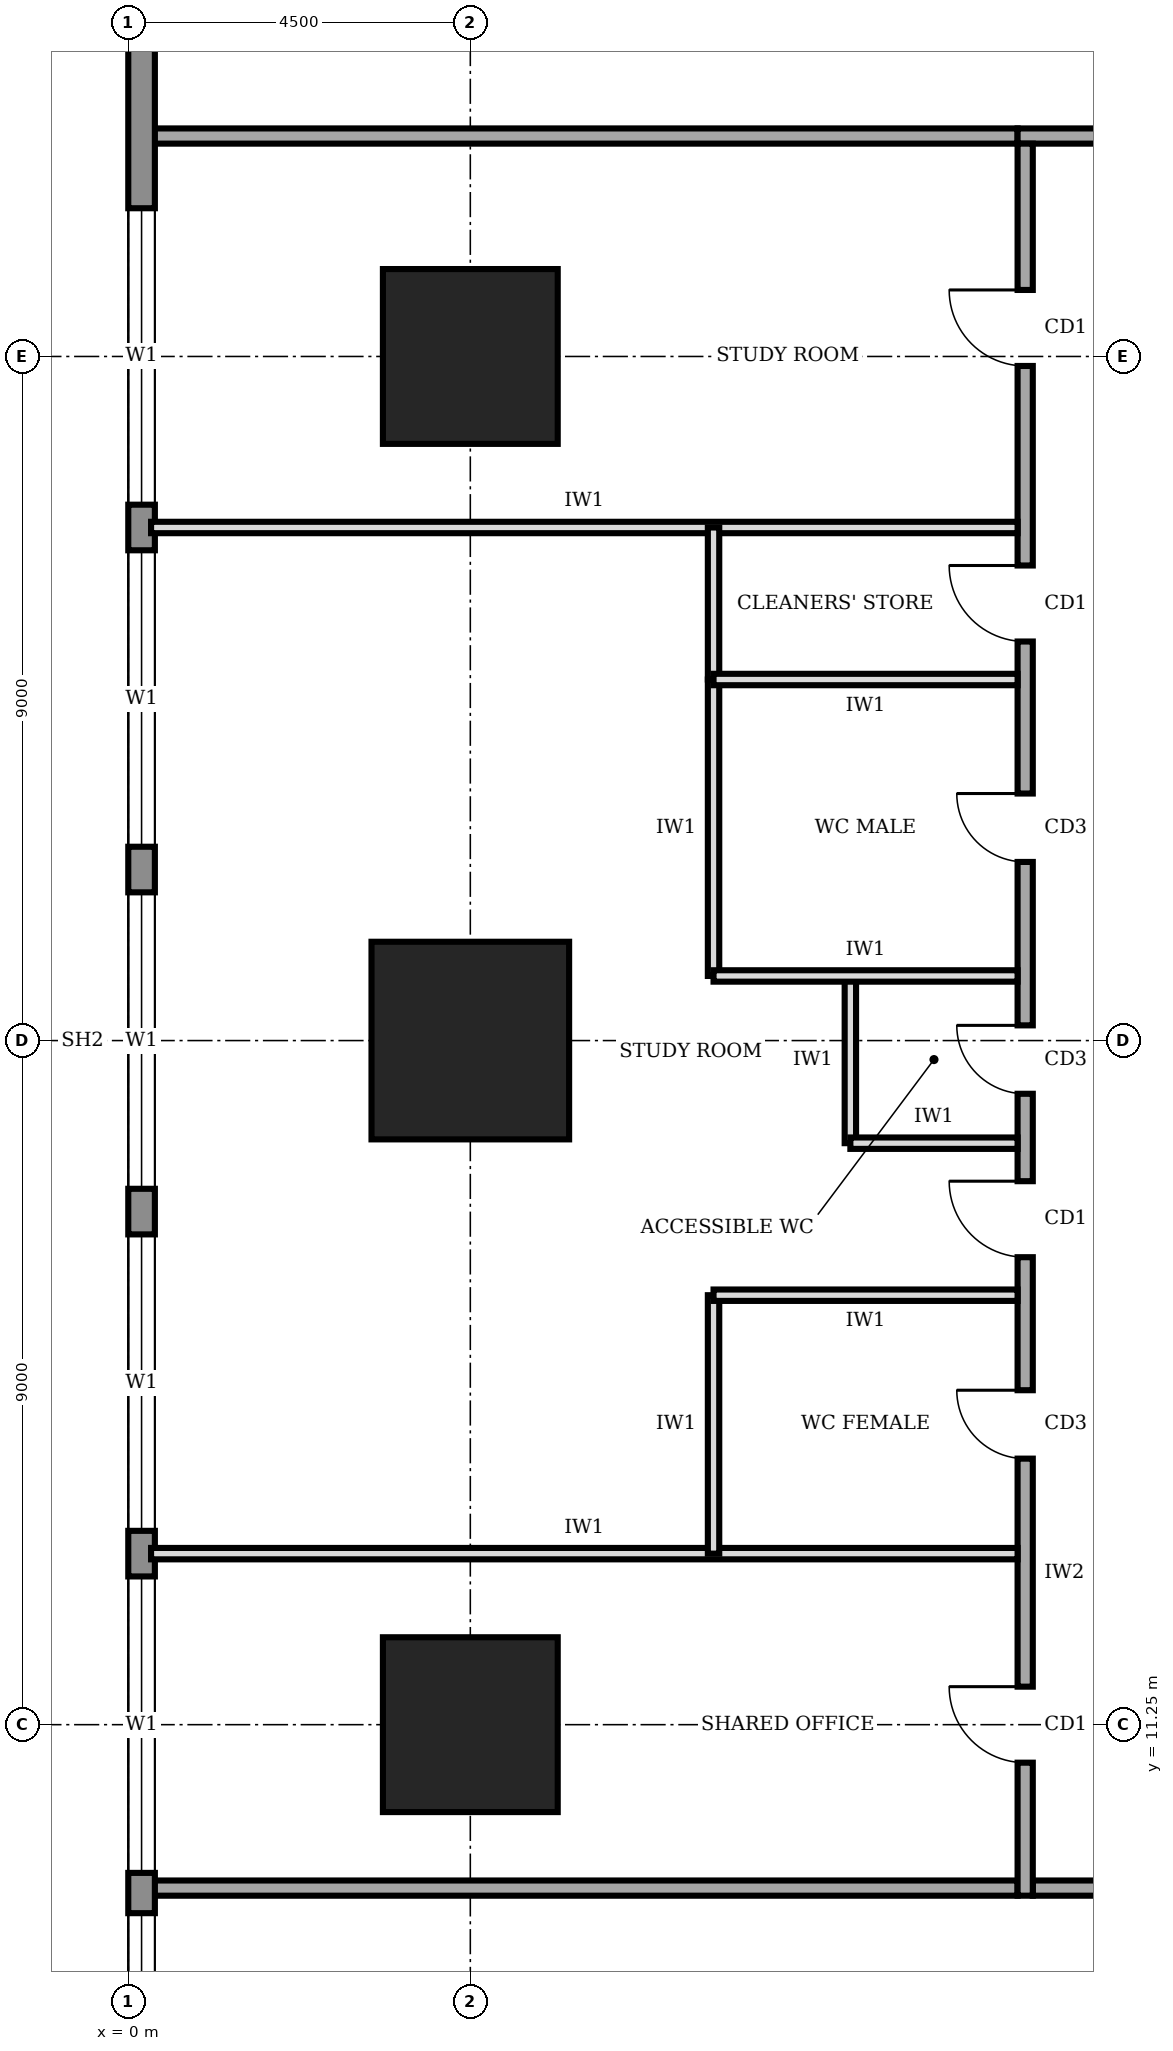
"""IFC4 building model, lengths in metres.
Left out: names, types, materials, properties, quantities, classifications, styles, units other than length and angle.
Written with IfcOpenShell. Run it as: python <this file> out.ifc"""

import sys

from ifc_helpers import new_model, si_unit, direction, frame, frame_2d, origin, origin_2d, place, context, subcontext, project, spatial, rectangle, extrude, element, fill, save


model = new_model("IFC4")
c1 = context("Model", 3, precision=1e-05, world=origin(), true_north=direction((0.0, 1.0)))
c2 = subcontext(c1, "Body", "Model", "MODEL_VIEW")
j1 = project(units=[si_unit("LENGTHUNIT", "METRE"), si_unit("PLANEANGLEUNIT", "RADIAN")], contexts=[c1])
p1 = place(None, origin())
s1 = spatial("IfcSite", under=j1, at=p1, CompositionType="ELEMENT")
p2 = place(p1, origin())
s2 = spatial("IfcBuilding", under=s1, at=p2, CompositionType="ELEMENT")
p3 = place(p2, frame((0.0, 0.0, 121.0)))
s3 = spatial("IfcBuildingStorey", under=s2, at=p3, CompositionType="ELEMENT", Elevation=121.0)
p4 = place(p3, frame((4.5, 11.25, 0.0), z_axis=(0.0, 0.0, 1.0), x_axis=(1.0, 0.0, 0.0)))
e1 = element("IfcColumn", 1, at=p4, inside=s3, PredefinedType="COLUMN", context=c2, shape_type="SweptSolid", body=[
    extrude(rectangle(XDim=2.3, YDim=2.3, at=origin_2d()), origin(), (0.0, 0.0, 1.0), 4.0),
])
p5 = place(p3, frame((4.5, 20.25, 0.0), z_axis=(0.0, 0.0, 1.0), x_axis=(1.0, 0.0, 0.0)))
e2 = element("IfcColumn", 2, at=p5, inside=s3, PredefinedType="COLUMN", context=c2, shape_type="SweptSolid", body=[
    extrude(rectangle(XDim=2.6, YDim=2.6, at=origin_2d()), origin(), (0.0, 0.0, 1.0), 4.0),
])
p6 = place(p3, frame((4.5, 29.25, 0.0), z_axis=(0.0, 0.0, 1.0), x_axis=(1.0, 0.0, 0.0)))
e3 = element("IfcColumn", 3, at=p6, inside=s3, PredefinedType="COLUMN", context=c2, shape_type="SweptSolid", body=[
    extrude(rectangle(XDim=2.3, YDim=2.3, at=origin_2d()), origin(), (0.0, 0.0, 1.0), 4.0),
])
p7 = place(p3, frame((0.175, 35.98, 0.0), z_axis=(0.0, 0.0, 1.0), x_axis=(0.0, -1.0, 0.0)))
e4 = element("IfcWall", 4, at=p7, inside=s3, PredefinedType="STANDARD", context=c2, shape_type="SweptSolid", body=[
    extrude(rectangle(XDim=31.46, YDim=0.35, at=frame_2d((15.73, 0.0))), origin(), (0.0, 0.0, 1.0), 3.75),
])
p8 = place(p7, frame((27.21, 0.0, 0.9)))
e5 = element("IfcOpeningElement", 5, at=p8, cuts=e4, PredefinedType="OPENING", context=c2, shape_type="SweptSolid", body=[
    extrude(rectangle(XDim=3.9, YDim=2.2, at=frame_2d((1.95, 1.1))), frame((0.0, 0.185, 0.0), z_axis=(0.0, -1.0, 0.0), x_axis=(1.0, 0.0, 0.0)), (0.0, 0.0, 1.0), 0.37),
])
p9 = place(p7, frame((22.78, 0.0, 0.9)))
e6 = element("IfcOpeningElement", 6, at=p9, cuts=e4, PredefinedType="OPENING", context=c2, shape_type="SweptSolid", body=[
    extrude(rectangle(XDim=3.9, YDim=2.2, at=frame_2d((1.95, 1.1))), frame((0.0, 0.185, 0.0), z_axis=(0.0, -1.0, 0.0), x_axis=(1.0, 0.0, 0.0)), (0.0, 0.0, 1.0), 0.37),
])
p10 = place(p7, frame((18.28, 0.0, 0.9)))
e7 = element("IfcOpeningElement", 7, at=p10, cuts=e4, PredefinedType="OPENING", context=c2, shape_type="SweptSolid", body=[
    extrude(rectangle(XDim=3.9, YDim=2.2, at=frame_2d((1.95, 1.1))), frame((0.0, 0.185, 0.0), z_axis=(0.0, -1.0, 0.0), x_axis=(1.0, 0.0, 0.0)), (0.0, 0.0, 1.0), 0.37),
])
p11 = place(p7, frame((13.78, 0.0, 0.9)))
e8 = element("IfcOpeningElement", 8, at=p11, cuts=e4, PredefinedType="OPENING", context=c2, shape_type="SweptSolid", body=[
    extrude(rectangle(XDim=3.9, YDim=2.2, at=frame_2d((1.95, 1.1))), frame((0.0, 0.185, 0.0), z_axis=(0.0, -1.0, 0.0), x_axis=(1.0, 0.0, 0.0)), (0.0, 0.0, 1.0), 0.37),
])
p12 = place(p7, frame((9.28, 0.0, 0.9)))
e9 = element("IfcOpeningElement", 9, at=p12, cuts=e4, PredefinedType="OPENING", context=c2, shape_type="SweptSolid", body=[
    extrude(rectangle(XDim=3.9, YDim=2.2, at=frame_2d((1.95, 1.1))), frame((0.0, 0.185, 0.0), z_axis=(0.0, -1.0, 0.0), x_axis=(1.0, 0.0, 0.0)), (0.0, 0.0, 1.0), 0.37),
])
p13 = place(p7, frame((4.78, 0.0, 0.9)))
e10 = element("IfcOpeningElement", 10, at=p13, cuts=e4, PredefinedType="OPENING", context=c2, shape_type="SweptSolid", body=[
    extrude(rectangle(XDim=3.9, YDim=2.2, at=frame_2d((1.95, 1.1))), frame((0.0, 0.185, 0.0), z_axis=(0.0, -1.0, 0.0), x_axis=(1.0, 0.0, 0.0)), (0.0, 0.0, 1.0), 0.37),
])
p14 = place(p3, frame((11.9, 9.1, 0.0), z_axis=(0.0, 0.0, 1.0), x_axis=(1.0, 0.0, 0.0)))
e11 = element("IfcWall", 11, at=p14, inside=s3, PredefinedType="SOLIDWALL", context=c2, shape_type="SweptSolid", body=[
    extrude(rectangle(XDim=17.65, YDim=0.2, at=frame_2d((8.825, 0.0))), origin(), (0.0, 0.0, 1.0), 3.75),
])
p15 = place(p14, frame((2.25, 0.0, 0.0)))
e12 = element("IfcOpeningElement", 12, at=p15, cuts=e11, PredefinedType="OPENING", context=c2, shape_type="SweptSolid", body=[
    extrude(rectangle(XDim=1.4, YDim=2.1, at=frame_2d((0.7, 1.05))), frame((0.0, 0.11, 0.0), z_axis=(0.0, -1.0, 0.0), x_axis=(1.0, 0.0, 0.0)), (0.0, 0.0, 1.0), 0.22),
])
p16 = place(p14, frame((10.1, 0.0, 0.0)))
e13 = element("IfcOpeningElement", 13, at=p16, cuts=e11, PredefinedType="OPENING", context=c2, shape_type="SweptSolid", body=[
    extrude(rectangle(XDim=1.0, YDim=2.1, at=frame_2d((0.5, 1.05))), frame((0.0, 0.11, 0.0), z_axis=(0.0, -1.0, 0.0), x_axis=(1.0, 0.0, 0.0)), (0.0, 0.0, 1.0), 0.22),
])
p17 = place(p14, frame((15.875, 0.0, 0.0)))
e14 = element("IfcOpeningElement", 14, at=p17, cuts=e11, PredefinedType="OPENING", context=c2, shape_type="SweptSolid", body=[
    extrude(rectangle(XDim=1.0, YDim=2.1, at=frame_2d((0.5, 1.05))), frame((0.0, 0.11, 0.0), z_axis=(0.0, -1.0, 0.0), x_axis=(1.0, 0.0, 0.0)), (0.0, 0.0, 1.0), 0.22),
])
p18 = place(p3, frame((29.35, 32.15, 0.0), z_axis=(0.0, 0.0, 1.0), x_axis=(-1.0, 0.0, 0.0)))
e15 = element("IfcWall", 15, at=p18, inside=s3, PredefinedType="SOLIDWALL", context=c2, shape_type="SweptSolid", body=[
    extrude(rectangle(XDim=17.65, YDim=0.2, at=frame_2d((8.825, 0.0))), origin(), (0.0, 0.0, 1.0), 3.75),
])
p19 = place(p18, frame((13.6, 0.0, 0.0)))
e16 = element("IfcOpeningElement", 16, at=p19, cuts=e15, PredefinedType="OPENING", context=c2, shape_type="SweptSolid", body=[
    extrude(rectangle(XDim=1.8, YDim=2.1, at=frame_2d((0.9, 1.05))), frame((0.0, 0.11, 0.0), z_axis=(0.0, -1.0, 0.0), x_axis=(1.0, 0.0, 0.0)), (0.0, 0.0, 1.0), 0.22),
])
p20 = place(p18, frame((6.35, 0.0, 0.0)))
e17 = element("IfcOpeningElement", 17, at=p20, cuts=e15, PredefinedType="OPENING", context=c2, shape_type="SweptSolid", body=[
    extrude(rectangle(XDim=1.0, YDim=2.1, at=frame_2d((0.5, 1.05))), frame((0.0, 0.11, 0.0), z_axis=(0.0, -1.0, 0.0), x_axis=(1.0, 0.0, 0.0)), (0.0, 0.0, 1.0), 0.22),
])
p21 = place(p18, frame((0.575, 0.0, 0.0)))
e18 = element("IfcOpeningElement", 18, at=p21, cuts=e15, PredefinedType="OPENING", context=c2, shape_type="SweptSolid", body=[
    extrude(rectangle(XDim=1.0, YDim=2.1, at=frame_2d((0.5, 1.05))), frame((0.0, 0.11, 0.0), z_axis=(0.0, -1.0, 0.0), x_axis=(1.0, 0.0, 0.0)), (0.0, 0.0, 1.0), 0.22),
])
p22 = place(p3, frame((11.8, 32.05, 0.0), z_axis=(0.0, 0.0, 1.0), x_axis=(0.0, -1.0, 0.0)))
e19 = element("IfcWall", 19, at=p22, inside=s3, PredefinedType="SOLIDWALL", context=c2, shape_type="SweptSolid", body=[
    extrude(rectangle(XDim=23.05, YDim=0.2, at=frame_2d((11.525, 0.0))), origin(), (0.0, 0.0, 1.0), 3.75),
])
p23 = place(p22, frame((20.3, 0.0, 0.0)))
e20 = element("IfcOpeningElement", 20, at=p23, cuts=e19, PredefinedType="OPENING", context=c2, shape_type="SweptSolid", body=[
    extrude(rectangle(XDim=1.0, YDim=2.1, at=frame_2d((0.5, 1.05))), frame((0.0, 0.11, 0.0), z_axis=(0.0, -1.0, 0.0), x_axis=(1.0, 0.0, 0.0)), (0.0, 0.0, 1.0), 0.22),
])
p24 = place(p22, frame((16.4, 0.0, 0.0)))
e21 = element("IfcOpeningElement", 21, at=p24, cuts=e19, PredefinedType="OPENING", context=c2, shape_type="SweptSolid", body=[
    extrude(rectangle(XDim=0.9, YDim=2.1, at=frame_2d((0.45, 1.05))), frame((0.0, 0.11, 0.0), z_axis=(0.0, -1.0, 0.0), x_axis=(1.0, 0.0, 0.0)), (0.0, 0.0, 1.0), 0.22),
])
p25 = place(p22, frame((11.6, 0.0, 0.0)))
e22 = element("IfcOpeningElement", 22, at=p25, cuts=e19, PredefinedType="OPENING", context=c2, shape_type="SweptSolid", body=[
    extrude(rectangle(XDim=0.9, YDim=2.1, at=frame_2d((0.45, 1.05))), frame((0.0, 0.11, 0.0), z_axis=(0.0, -1.0, 0.0), x_axis=(1.0, 0.0, 0.0)), (0.0, 0.0, 1.0), 0.22),
])
p26 = place(p22, frame((8.55, 0.0, 0.0)))
e23 = element("IfcOpeningElement", 23, at=p26, cuts=e19, PredefinedType="OPENING", context=c2, shape_type="SweptSolid", body=[
    extrude(rectangle(XDim=0.9, YDim=2.1, at=frame_2d((0.45, 1.05))), frame((0.0, 0.11, 0.0), z_axis=(0.0, -1.0, 0.0), x_axis=(1.0, 0.0, 0.0)), (0.0, 0.0, 1.0), 0.22),
])
p27 = place(p22, frame((5.55, 0.0, 0.0)))
e24 = element("IfcOpeningElement", 24, at=p27, cuts=e19, PredefinedType="OPENING", context=c2, shape_type="SweptSolid", body=[
    extrude(rectangle(XDim=1.0, YDim=2.1, at=frame_2d((0.5, 1.05))), frame((0.0, 0.11, 0.0), z_axis=(0.0, -1.0, 0.0), x_axis=(1.0, 0.0, 0.0)), (0.0, 0.0, 1.0), 0.22),
])
p28 = place(p22, frame((13.65, 0.0, 0.0)))
e25 = element("IfcOpeningElement", 25, at=p28, cuts=e19, PredefinedType="OPENING", context=c2, shape_type="SweptSolid", body=[
    extrude(rectangle(XDim=1.0, YDim=2.1, at=frame_2d((0.5, 1.05))), frame((0.0, 0.11, 0.0), z_axis=(0.0, -1.0, 0.0), x_axis=(1.0, 0.0, 0.0)), (0.0, 0.0, 1.0), 0.22),
])
p29 = place(p22, frame((1.925, 0.0, 0.0)))
e26 = element("IfcOpeningElement", 26, at=p29, cuts=e19, PredefinedType="OPENING", context=c2, shape_type="SweptSolid", body=[
    extrude(rectangle(XDim=1.0, YDim=2.1, at=frame_2d((0.5, 1.05))), frame((0.0, 0.11, 0.0), z_axis=(0.0, -1.0, 0.0), x_axis=(1.0, 0.0, 0.0)), (0.0, 0.0, 1.0), 0.22),
])
for number, where, z_axis, x_axis in (
    (27, (0.3, 9.1, 0.0), (0.0, 0.0, 1.0), (1.0, 0.0, 0.0)),
    (28, (0.3, 32.15, 0.0), (0.0, 0.0, 1.0), (1.0, 0.0, 0.0)),
):
    element("IfcWall", number, at=place(p3, frame(where, z_axis=z_axis, x_axis=x_axis)), inside=s3, PredefinedType="SOLIDWALL", context=c2, shape_type="SweptSolid", body=[
        extrude(rectangle(XDim=11.4, YDim=0.2, at=frame_2d((5.7, 0.0))), origin(), (0.0, 0.0, 1.0), 3.75),
    ])
for number, where, z_axis, x_axis in (
    (29, (0.3, 13.5, 0.0), (0.0, 0.0, 1.0), (1.0, 0.0, 0.0)),
    (30, (0.3, 27.0, 0.0), (0.0, 0.0, 1.0), (1.0, 0.0, 0.0)),
):
    element("IfcWall", number, at=place(p3, frame(where, z_axis=z_axis, x_axis=x_axis)), inside=s3, PredefinedType="PARTITIONING", context=c2, shape_type="SweptSolid", body=[
        extrude(rectangle(XDim=11.4, YDim=0.15, at=frame_2d((5.7, 0.0))), origin(), (0.0, 0.0, 1.0), 3.75),
    ])
p30 = place(p3, frame((11.7, 16.9, 0.0), z_axis=(0.0, 0.0, 1.0), x_axis=(-1.0, 0.0, 0.0)))
e31 = element("IfcWall", 31, at=p30, inside=s3, PredefinedType="PARTITIONING", context=c2, shape_type="SweptSolid", body=[
    extrude(rectangle(XDim=4.0, YDim=0.15, at=frame_2d((2.0, 0.0))), origin(), (0.0, 0.0, 1.0), 3.75),
])
p31 = place(p3, frame((11.7, 18.9, 0.0), z_axis=(0.0, 0.0, 1.0), x_axis=(-1.0, 0.0, 0.0)))
e32 = element("IfcWall", 32, at=p31, inside=s3, PredefinedType="PARTITIONING", context=c2, shape_type="SweptSolid", body=[
    extrude(rectangle(XDim=2.2, YDim=0.15, at=frame_2d((1.1, 0.0))), origin(), (0.0, 0.0, 1.0), 3.75),
])
p32 = place(p3, frame((11.7, 21.1, 0.0), z_axis=(0.0, 0.0, 1.0), x_axis=(-1.0, 0.0, 0.0)))
e33 = element("IfcWall", 33, at=p32, inside=s3, PredefinedType="PARTITIONING", context=c2, shape_type="SweptSolid", body=[
    extrude(rectangle(XDim=4.0, YDim=0.15, at=frame_2d((2.0, 0.0))), origin(), (0.0, 0.0, 1.0), 2.85),
])
p33 = place(p3, frame((11.7, 25.0, 0.0), z_axis=(0.0, 0.0, 1.0), x_axis=(-1.0, 0.0, 0.0)))
e34 = element("IfcWall", 34, at=p33, inside=s3, PredefinedType="PARTITIONING", context=c2, shape_type="SweptSolid", body=[
    extrude(rectangle(XDim=4.0, YDim=0.15, at=frame_2d((2.0, 0.0))), origin(), (0.0, 0.0, 1.0), 3.75),
])
p34 = place(p3, frame((7.7, 13.5, 0.0), z_axis=(0.0, 0.0, 1.0), x_axis=(0.0, 1.0, 0.0)))
e35 = element("IfcWall", 35, at=p34, inside=s3, PredefinedType="PARTITIONING", context=c2, shape_type="SweptSolid", body=[
    extrude(rectangle(XDim=3.4, YDim=0.15, at=frame_2d((1.7, 0.0))), origin(), (0.0, 0.0, 1.0), 3.75),
])
p35 = place(p3, frame((9.5, 18.9, 0.0), z_axis=(0.0, 0.0, 1.0), x_axis=(0.0, 1.0, 0.0)))
e36 = element("IfcWall", 36, at=p35, inside=s3, PredefinedType="PARTITIONING", context=c2, shape_type="SweptSolid", body=[
    extrude(rectangle(XDim=2.2, YDim=0.15, at=frame_2d((1.1, 0.0))), origin(), (0.0, 0.0, 1.0), 3.75),
])
p36 = place(p3, frame((7.7, 21.1, 0.0), z_axis=(0.0, 0.0, 1.0), x_axis=(0.0, 1.0, 0.0)))
e37 = element("IfcWall", 37, at=p36, inside=s3, PredefinedType="PARTITIONING", context=c2, shape_type="SweptSolid", body=[
    extrude(rectangle(XDim=3.9, YDim=0.15, at=frame_2d((1.95, 0.0))), origin(), (0.0, 0.0, 1.0), 3.75),
])
p37 = place(p3, frame((7.7, 25.0, 0.0), z_axis=(0.0, 0.0, 1.0), x_axis=(0.0, 1.0, 0.0)))
e38 = element("IfcWall", 38, at=p37, inside=s3, PredefinedType="PARTITIONING", context=c2, shape_type="SweptSolid", body=[
    extrude(rectangle(XDim=2.0, YDim=0.15, at=frame_2d((1.0, 0.0))), origin(), (0.0, 0.0, 1.0), 3.75),
])
p38 = place(p8, origin())
e39 = element("IfcWindow", 39, at=p38, inside=s3, PartitioningType="SINGLE_PANEL", PredefinedType="WINDOW", context=c2, shape_type="SweptSolid", body=[
    extrude(rectangle(XDim=3.9, YDim=2.2, at=frame_2d((1.95, 1.1))), frame((0.0, 0.03, 0.0), z_axis=(0.0, -1.0, 0.0), x_axis=(1.0, 0.0, 0.0)), (0.0, 0.0, 1.0), 0.06),
])
fill(e5, e39)
p39 = place(p9, origin())
e40 = element("IfcWindow", 40, at=p39, inside=s3, PartitioningType="SINGLE_PANEL", PredefinedType="WINDOW", context=c2, shape_type="SweptSolid", body=[
    extrude(rectangle(XDim=3.9, YDim=2.2, at=frame_2d((1.95, 1.1))), frame((0.0, 0.03, 0.0), z_axis=(0.0, -1.0, 0.0), x_axis=(1.0, 0.0, 0.0)), (0.0, 0.0, 1.0), 0.06),
])
fill(e6, e40)
p40 = place(p10, origin())
e41 = element("IfcWindow", 41, at=p40, inside=s3, PartitioningType="SINGLE_PANEL", PredefinedType="WINDOW", context=c2, shape_type="SweptSolid", body=[
    extrude(rectangle(XDim=3.9, YDim=2.2, at=frame_2d((1.95, 1.1))), frame((0.0, 0.03, 0.0), z_axis=(0.0, -1.0, 0.0), x_axis=(1.0, 0.0, 0.0)), (0.0, 0.0, 1.0), 0.06),
])
fill(e7, e41)
p41 = place(p11, origin())
e42 = element("IfcWindow", 42, at=p41, inside=s3, PartitioningType="SINGLE_PANEL", PredefinedType="WINDOW", context=c2, shape_type="SweptSolid", body=[
    extrude(rectangle(XDim=3.9, YDim=2.2, at=frame_2d((1.95, 1.1))), frame((0.0, 0.03, 0.0), z_axis=(0.0, -1.0, 0.0), x_axis=(1.0, 0.0, 0.0)), (0.0, 0.0, 1.0), 0.06),
])
fill(e8, e42)
p42 = place(p12, origin())
e43 = element("IfcWindow", 43, at=p42, inside=s3, PartitioningType="SINGLE_PANEL", PredefinedType="WINDOW", context=c2, shape_type="SweptSolid", body=[
    extrude(rectangle(XDim=3.9, YDim=2.2, at=frame_2d((1.95, 1.1))), frame((0.0, 0.03, 0.0), z_axis=(0.0, -1.0, 0.0), x_axis=(1.0, 0.0, 0.0)), (0.0, 0.0, 1.0), 0.06),
])
fill(e9, e43)
p43 = place(p13, origin())
e44 = element("IfcWindow", 44, at=p43, inside=s3, PartitioningType="SINGLE_PANEL", PredefinedType="WINDOW", context=c2, shape_type="SweptSolid", body=[
    extrude(rectangle(XDim=3.9, YDim=2.2, at=frame_2d((1.95, 1.1))), frame((0.0, 0.03, 0.0), z_axis=(0.0, -1.0, 0.0), x_axis=(1.0, 0.0, 0.0)), (0.0, 0.0, 1.0), 0.06),
])
fill(e10, e44)
p44 = place(p23, frame((1.0, 0.0, 0.0), z_axis=(0.0, 0.0, 1.0), x_axis=(-1.0, 0.0, 0.0)))
e45 = element("IfcDoor", 45, at=p44, inside=s3, OperationType="SINGLE_SWING_RIGHT", PredefinedType="DOOR", context=c2, shape_type="SweptSolid", body=[
    extrude(rectangle(XDim=1.0, YDim=2.1, at=frame_2d((0.5, 1.05))), frame((0.0, 0.025, 0.0), z_axis=(0.0, -1.0, 0.0), x_axis=(1.0, 0.0, 0.0)), (0.0, 0.0, 1.0), 0.05),
])
fill(e20, e45)
p45 = place(p24, frame((0.9, 0.0, 0.0), z_axis=(0.0, 0.0, 1.0), x_axis=(-1.0, 0.0, 0.0)))
e46 = element("IfcDoor", 46, at=p45, inside=s3, OperationType="SINGLE_SWING_RIGHT", PredefinedType="DOOR", context=c2, shape_type="SweptSolid", body=[
    extrude(rectangle(XDim=0.9, YDim=2.1, at=frame_2d((0.45, 1.05))), frame((0.0, 0.025, 0.0), z_axis=(0.0, -1.0, 0.0), x_axis=(1.0, 0.0, 0.0)), (0.0, 0.0, 1.0), 0.05),
])
fill(e21, e46)
p46 = place(p25, frame((0.9, 0.0, 0.0), z_axis=(0.0, 0.0, 1.0), x_axis=(-1.0, 0.0, 0.0)))
e47 = element("IfcDoor", 47, at=p46, inside=s3, OperationType="SINGLE_SWING_RIGHT", PredefinedType="DOOR", context=c2, shape_type="SweptSolid", body=[
    extrude(rectangle(XDim=0.9, YDim=2.1, at=frame_2d((0.45, 1.05))), frame((0.0, 0.025, 0.0), z_axis=(0.0, -1.0, 0.0), x_axis=(1.0, 0.0, 0.0)), (0.0, 0.0, 1.0), 0.05),
])
fill(e22, e47)
p47 = place(p26, frame((0.9, 0.0, 0.0), z_axis=(0.0, 0.0, 1.0), x_axis=(-1.0, 0.0, 0.0)))
e48 = element("IfcDoor", 48, at=p47, inside=s3, OperationType="SINGLE_SWING_RIGHT", PredefinedType="DOOR", context=c2, shape_type="SweptSolid", body=[
    extrude(rectangle(XDim=0.9, YDim=2.1, at=frame_2d((0.45, 1.05))), frame((0.0, 0.025, 0.0), z_axis=(0.0, -1.0, 0.0), x_axis=(1.0, 0.0, 0.0)), (0.0, 0.0, 1.0), 0.05),
])
fill(e23, e48)
p48 = place(p27, frame((1.0, 0.0, 0.0), z_axis=(0.0, 0.0, 1.0), x_axis=(-1.0, 0.0, 0.0)))
e49 = element("IfcDoor", 49, at=p48, inside=s3, OperationType="SINGLE_SWING_RIGHT", PredefinedType="DOOR", context=c2, shape_type="SweptSolid", body=[
    extrude(rectangle(XDim=1.0, YDim=2.1, at=frame_2d((0.5, 1.05))), frame((0.0, 0.025, 0.0), z_axis=(0.0, -1.0, 0.0), x_axis=(1.0, 0.0, 0.0)), (0.0, 0.0, 1.0), 0.05),
])
fill(e24, e49)
p49 = place(p28, frame((1.0, 0.0, 0.0), z_axis=(0.0, 0.0, 1.0), x_axis=(-1.0, 0.0, 0.0)))
e50 = element("IfcDoor", 50, at=p49, inside=s3, OperationType="SINGLE_SWING_RIGHT", PredefinedType="DOOR", context=c2, shape_type="SweptSolid", body=[
    extrude(rectangle(XDim=1.0, YDim=2.1, at=frame_2d((0.5, 1.05))), frame((0.0, 0.025, 0.0), z_axis=(0.0, -1.0, 0.0), x_axis=(1.0, 0.0, 0.0)), (0.0, 0.0, 1.0), 0.05),
])
fill(e25, e50)
p50 = place(p29, frame((1.0, 0.0, 0.0), z_axis=(0.0, 0.0, 1.0), x_axis=(-1.0, 0.0, 0.0)))
e51 = element("IfcDoor", 51, at=p50, inside=s3, OperationType="SINGLE_SWING_RIGHT", PredefinedType="DOOR", context=c2, shape_type="SweptSolid", body=[
    extrude(rectangle(XDim=1.0, YDim=2.1, at=frame_2d((0.5, 1.05))), frame((0.0, 0.025, 0.0), z_axis=(0.0, -1.0, 0.0), x_axis=(1.0, 0.0, 0.0)), (0.0, 0.0, 1.0), 0.05),
])
fill(e26, e51)
save(model, sys.argv[1])
